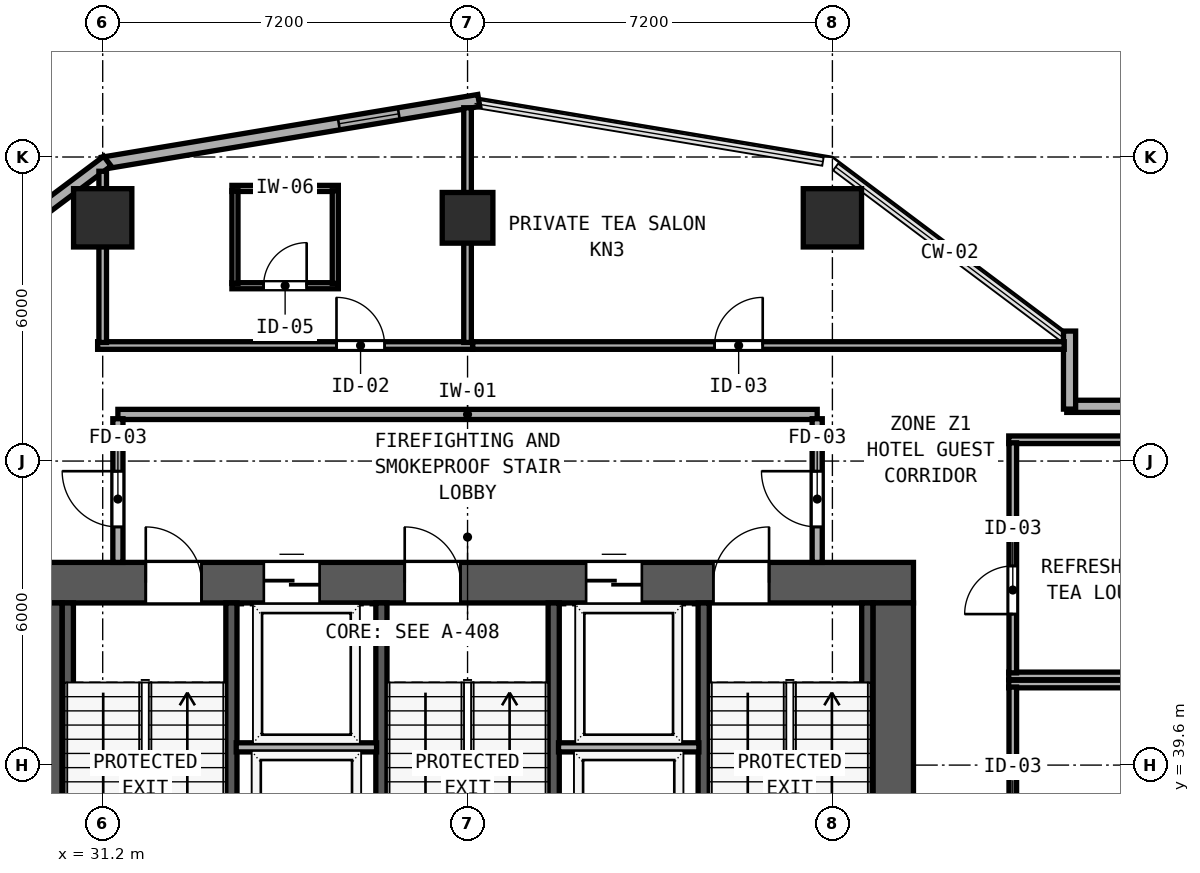
"""IFC4 building model, lengths in metres.
Left out: names, types, materials, properties, quantities, classifications, styles, units other than length and angle.
Written with IfcOpenShell. Run it as: python <this file> out.ifc"""

import sys

from ifc_helpers import new_model, si_unit, direction, frame, frame_2d, origin, origin_2d, place, context, subcontext, project, spatial, rectangle, hollow_rectangle, extrude, element, fill, save


model = new_model("IFC4")
c1 = context("Model", 3, precision=1e-05, world=origin(), true_north=direction((0.0, 1.0)))
c2 = subcontext(c1, "Body", "Model", "MODEL_VIEW")
j1 = project(units=[si_unit("LENGTHUNIT", "METRE"), si_unit("PLANEANGLEUNIT", "RADIAN")], contexts=[c1])
p1 = place(None, origin())
s1 = spatial("IfcSite", under=j1, at=p1, CompositionType="ELEMENT")
p2 = place(p1, origin())
s2 = spatial("IfcBuilding", under=s1, at=p2, CompositionType="ELEMENT")
p3 = place(p2, frame((0.0, 0.0, 85.6)))
s3 = spatial("IfcBuildingStorey", under=s2, at=p3, CompositionType="ELEMENT", Elevation=85.6)
p4 = place(p3, frame((29.6, 43.2, 0.0), z_axis=(0.0, 0.0, 1.0), x_axis=(1.0, 0.0, 0.0)))
e1 = element("IfcWall", 1, at=p4, inside=s3, PredefinedType="SHEAR", context=c2, shape_type="SweptSolid", body=[
    extrude(rectangle(XDim=17.6, YDim=0.8, at=frame_2d((8.8, 0.0))), origin(), (0.0, 0.0, 1.0), 3.54),
])
p5 = place(p4, frame((2.45, 0.0, 0.0)))
e2 = element("IfcOpeningElement", 2, at=p5, cuts=e1, PredefinedType="OPENING", context=c2, shape_type="SweptSolid", body=[
    extrude(rectangle(XDim=1.1, YDim=2.15, at=frame_2d((0.55, 1.075))), frame((0.0, 0.41, 0.0), z_axis=(0.0, -1.0, 0.0), x_axis=(1.0, 0.0, 0.0)), (0.0, 0.0, 1.0), 0.82),
])
p6 = place(p4, frame((7.56, 0.0, 0.0)))
e3 = element("IfcOpeningElement", 3, at=p6, cuts=e1, PredefinedType="OPENING", context=c2, shape_type="SweptSolid", body=[
    extrude(rectangle(XDim=1.1, YDim=2.15, at=frame_2d((0.55, 1.075))), frame((0.0, 0.41, 0.0), z_axis=(0.0, -1.0, 0.0), x_axis=(1.0, 0.0, 0.0)), (0.0, 0.0, 1.0), 0.82),
])
p7 = place(p4, frame((13.65, 0.0, 0.0)))
e4 = element("IfcOpeningElement", 4, at=p7, cuts=e1, PredefinedType="OPENING", context=c2, shape_type="SweptSolid", body=[
    extrude(rectangle(XDim=1.1, YDim=2.15, at=frame_2d((0.55, 1.075))), frame((0.0, 0.41, 0.0), z_axis=(0.0, -1.0, 0.0), x_axis=(1.0, 0.0, 0.0)), (0.0, 0.0, 1.0), 0.82),
])
p8 = place(p4, frame((4.78, 0.0, 0.0)))
e5 = element("IfcOpeningElement", 5, at=p8, cuts=e1, PredefinedType="OPENING", context=c2, shape_type="SweptSolid", body=[
    extrude(rectangle(XDim=1.1, YDim=2.2, at=frame_2d((0.55, 1.1))), frame((0.0, 0.41, 0.0), z_axis=(0.0, -1.0, 0.0), x_axis=(1.0, 0.0, 0.0)), (0.0, 0.0, 1.0), 0.82),
])
p9 = place(p4, frame((11.14, 0.0, 0.0)))
e6 = element("IfcOpeningElement", 6, at=p9, cuts=e1, PredefinedType="OPENING", context=c2, shape_type="SweptSolid", body=[
    extrude(rectangle(XDim=1.1, YDim=2.2, at=frame_2d((0.55, 1.1))), frame((0.0, 0.41, 0.0), z_axis=(0.0, -1.0, 0.0), x_axis=(1.0, 0.0, 0.0)), (0.0, 0.0, 1.0), 0.82),
])
for number, where, z_axis, x_axis in (
    (7, (30.0, 32.8, 0.0), (0.0, 0.0, 1.0), (0.0, 1.0, 0.0)),
    (8, (46.8, 32.8, 0.0), (0.0, 0.0, 1.0), (0.0, 1.0, 0.0)),
):
    element("IfcWall", number, at=place(p3, frame(where, z_axis=z_axis, x_axis=x_axis)), inside=s3, PredefinedType="SHEAR", context=c2, shape_type="SweptSolid", body=[
        extrude(rectangle(XDim=10.0, YDim=0.8, at=frame_2d((5.0, 0.0))), origin(), (0.0, 0.0, 1.0), 3.54),
    ])
for number, where, z_axis, x_axis in (
    (9, (30.512, 35.39, 0.0), (0.0, 0.0, 1.0), (0.0, 1.0, 0.0)),
    (10, (33.74, 35.39, 0.0), (0.0, 0.0, 1.0), (0.0, 1.0, 0.0)),
    (11, (36.7, 35.39, 0.0), (0.0, 0.0, 1.0), (0.0, 1.0, 0.0)),
    (12, (40.1, 35.39, 0.0), (0.0, 0.0, 1.0), (0.0, 1.0, 0.0)),
    (13, (43.06, 35.39, 0.0), (0.0, 0.0, 1.0), (0.0, 1.0, 0.0)),
    (14, (46.288, 35.39, 0.0), (0.0, 0.0, 1.0), (0.0, 1.0, 0.0)),
):
    element("IfcWall", number, at=place(p3, frame(where, z_axis=z_axis, x_axis=x_axis)), inside=s3, PredefinedType="SHEAR", context=c2, shape_type="SweptSolid", body=[
        extrude(rectangle(XDim=7.41, YDim=0.22, at=frame_2d((3.705, 0.0))), origin(), (0.0, 0.0, 1.0), 3.54),
    ])
for number, where, z_axis, x_axis in (
    (15, (31.2, 50.4, 0.0), (0.0, 0.0, 1.0), (1.0, 0.0, 0.0)),
    (16, (45.6, 50.4, 0.0), (0.0, 0.0, 1.0), (1.0, 0.0, 0.0)),
):
    element("IfcColumn", number, at=place(p3, frame(where, z_axis=z_axis, x_axis=x_axis)), inside=s3, PredefinedType="COLUMN", context=c2, shape_type="SweptSolid", body=[
        extrude(hollow_rectangle(XDim=1.15, YDim=1.15, WallThickness=0.042, at=origin_2d()), origin(), (0.0, 0.0, 1.0), 3.8),
    ])
p10 = place(p3, frame((38.4, 50.4, 0.0), z_axis=(0.0, 0.0, 1.0), x_axis=(1.0, 0.0, 0.0)))
e17 = element("IfcColumn", 17, at=p10, inside=s3, PredefinedType="COLUMN", context=c2, shape_type="SweptSolid", body=[
    extrude(hollow_rectangle(XDim=1.0, YDim=1.0, WallThickness=0.038, at=origin_2d()), origin(), (0.0, 0.0, 1.0), 3.8),
])
p11 = place(p3, frame((51.535, 46.68, 0.0), z_axis=(0.0, 0.0, 1.0), x_axis=(-1.0, 0.0, 0.0)))
e18 = element("IfcWall", 18, at=p11, inside=s3, PredefinedType="SOLIDWALL", context=c2, shape_type="SweptSolid", body=[
    extrude(rectangle(XDim=1.31, YDim=0.24, at=frame_2d((0.655, 0.0))), origin(), (0.0, 0.0, 1.0), 3.54),
])
p12 = place(p3, frame((50.28, 46.625, 0.0), z_axis=(0.0, 0.0, 1.0), x_axis=(0.0, 1.0, 0.0)))
e19 = element("IfcWall", 19, at=p12, inside=s3, PredefinedType="SOLIDWALL", context=c2, shape_type="SweptSolid", body=[
    extrude(rectangle(XDim=1.54, YDim=0.24, at=frame_2d((0.77, 0.0))), origin(), (0.0, 0.0, 1.0), 3.54),
])
p13 = place(p3, frame((38.622, 52.715, 0.0), z_axis=(0.0, 0.0, 1.0), x_axis=(-0.98639129485, -0.164414760418, 0.0)))
e20 = element("IfcWall", 20, at=p13, inside=s3, PredefinedType="SOLIDWALL", context=c2, shape_type="SweptSolid", body=[
    extrude(rectangle(XDim=7.53, YDim=0.24, at=frame_2d((3.765, 0.0))), origin(), (0.0, 0.0, 1.0), 3.54),
])
p14 = place(p13, frame((1.6, 0.0, 0.85)))
e21 = element("IfcOpeningElement", 21, at=p14, cuts=e20, PredefinedType="OPENING", context=c2, shape_type="SweptSolid", body=[
    extrude(rectangle(XDim=1.2, YDim=1.85, at=frame_2d((0.6, 0.925))), frame((0.0, 0.13, 0.0), z_axis=(0.0, -1.0, 0.0), x_axis=(1.0, 0.0, 0.0)), (0.0, 0.0, 1.0), 0.26),
])
p15 = place(p3, frame((31.292, 51.519, 0.0), z_axis=(0.0, 0.0, 1.0), x_axis=(-0.8, -0.6, 0.0)))
e22 = element("IfcWall", 22, at=p15, inside=s3, PredefinedType="SOLIDWALL", context=c2, shape_type="SweptSolid", body=[
    extrude(rectangle(XDim=6.021, YDim=0.24, at=frame_2d((3.01, 0.0))), origin(), (0.0, 0.0, 1.0), 3.54),
])
p16 = place(p15, frame((1.6, 0.0, 0.85)))
e23 = element("IfcOpeningElement", 23, at=p16, cuts=e22, PredefinedType="OPENING", context=c2, shape_type="SweptSolid", body=[
    extrude(rectangle(XDim=1.2, YDim=1.85, at=frame_2d((0.6, 0.925))), frame((0.0, 0.13, 0.0), z_axis=(0.0, -1.0, 0.0), x_axis=(1.0, 0.0, 0.0)), (0.0, 0.0, 1.0), 0.26),
])
p17 = place(p3, frame((31.5, 46.52, 0.0), z_axis=(0.0, 0.0, 1.0), x_axis=(1.0, 0.0, 0.0)))
e24 = element("IfcWall", 24, at=p17, inside=s3, PredefinedType="SOLIDWALL", context=c2, shape_type="SweptSolid", body=[
    extrude(rectangle(XDim=13.8, YDim=0.2, at=frame_2d((6.9, 0.0))), origin(), (0.0, 0.0, 1.0), 3.54),
])
p18 = place(p3, frame((31.5, 43.6, 0.0), z_axis=(0.0, 0.0, 1.0), x_axis=(0.0, 1.0, 0.0)))
e25 = element("IfcWall", 25, at=p18, inside=s3, PredefinedType="SOLIDWALL", context=c2, shape_type="SweptSolid", body=[
    extrude(rectangle(XDim=2.835, YDim=0.2, at=frame_2d((1.417, 0.0))), origin(), (0.0, 0.0, 1.0), 3.54),
])
p19 = place(p18, frame((1.8, 0.0, 0.0), z_axis=(0.0, 0.0, 1.0), x_axis=(-1.0, 0.0, 0.0)))
e26 = element("IfcOpeningElement", 26, at=p19, cuts=e25, PredefinedType="OPENING", context=c2, shape_type="SweptSolid", body=[
    extrude(rectangle(XDim=1.1, YDim=2.15, at=frame_2d((0.55, 1.075))), frame((0.0, 0.11, 0.0), z_axis=(0.0, -1.0, 0.0), x_axis=(1.0, 0.0, 0.0)), (0.0, 0.0, 1.0), 0.22),
])
p20 = place(p3, frame((45.3, 43.6, 0.0), z_axis=(0.0, 0.0, 1.0), x_axis=(0.0, 1.0, 0.0)))
e27 = element("IfcWall", 27, at=p20, inside=s3, PredefinedType="SOLIDWALL", context=c2, shape_type="SweptSolid", body=[
    extrude(rectangle(XDim=2.835, YDim=0.2, at=frame_2d((1.417, 0.0))), origin(), (0.0, 0.0, 1.0), 3.54),
])
p21 = place(p20, frame((0.7, 0.0, 0.0)))
e28 = element("IfcOpeningElement", 28, at=p21, cuts=e27, PredefinedType="OPENING", context=c2, shape_type="SweptSolid", body=[
    extrude(rectangle(XDim=1.1, YDim=2.15, at=frame_2d((0.55, 1.075))), frame((0.0, 0.11, 0.0), z_axis=(0.0, -1.0, 0.0), x_axis=(1.0, 0.0, 0.0)), (0.0, 0.0, 1.0), 0.22),
])
for number, where, z_axis, x_axis in (
    (29, (33.835, 39.95, 0.0), (0.0, 0.0, 1.0), (1.0, 0.0, 0.0)),
    (30, (40.195, 39.95, 0.0), (0.0, 0.0, 1.0), (1.0, 0.0, 0.0)),
):
    element("IfcWall", number, at=place(p3, frame(where, z_axis=z_axis, x_axis=x_axis)), inside=s3, PredefinedType="SOLIDWALL", context=c2, shape_type="SweptSolid", body=[
        extrude(rectangle(XDim=2.77, YDim=0.18, at=frame_2d((1.385, 0.0))), origin(), (0.0, 0.0, 1.0), 3.54),
    ])
p22 = place(p3, frame((49.08, 41.2, 0.0), z_axis=(0.0, 0.0, 1.0), x_axis=(1.0, 0.0, 0.0)))
e31 = element("IfcWall", 31, at=p22, inside=s3, PredefinedType="PARTITIONING", context=c2, shape_type="SweptSolid", body=[
    extrude(rectangle(XDim=3.8, YDim=0.15, at=frame_2d((1.9, 0.0))), origin(), (0.0, 0.0, 1.0), 3.54),
])
p23 = place(p3, frame((49.16, 36.52, 0.0), z_axis=(0.0, 0.0, 1.0), x_axis=(0.0, 1.0, 0.0)))
e32 = element("IfcWall", 32, at=p23, inside=s3, PredefinedType="PARTITIONING", context=c2, shape_type="SweptSolid", body=[
    extrude(rectangle(XDim=4.62, YDim=0.15, at=frame_2d((2.31, 0.0))), origin(), (0.0, 0.0, 1.0), 3.54),
])
p24 = place(p23, frame((1.36, 0.0, 0.0)))
e33 = element("IfcOpeningElement", 33, at=p24, cuts=e32, PredefinedType="OPENING", context=c2, shape_type="SweptSolid", body=[
    extrude(rectangle(XDim=0.95, YDim=2.12, at=frame_2d((0.475, 1.06))), frame((0.0, 0.085, 0.0), z_axis=(0.0, -1.0, 0.0), x_axis=(1.0, 0.0, 0.0)), (0.0, 0.0, 1.0), 0.17),
])
p25 = place(p3, frame((49.08, 46.02, 0.0), z_axis=(0.0, 0.0, 1.0), x_axis=(1.0, 0.0, 0.0)))
e34 = element("IfcWall", 34, at=p25, inside=s3, PredefinedType="PARTITIONING", context=c2, shape_type="SweptSolid", body=[
    extrude(rectangle(XDim=2.295, YDim=0.15, at=frame_2d((1.147, 0.0))), origin(), (0.0, 0.0, 1.0), 3.54),
])
p26 = place(p3, frame((49.08, 41.36, 0.0), z_axis=(0.0, 0.0, 1.0), x_axis=(1.0, 0.0, 0.0)))
e35 = element("IfcWall", 35, at=p26, inside=s3, PredefinedType="PARTITIONING", context=c2, shape_type="SweptSolid", body=[
    extrude(rectangle(XDim=3.8, YDim=0.15, at=frame_2d((1.9, 0.0))), origin(), (0.0, 0.0, 1.0), 3.54),
])
p27 = place(p3, frame((49.16, 41.42, 0.0), z_axis=(0.0, 0.0, 1.0), x_axis=(0.0, 1.0, 0.0)))
e36 = element("IfcWall", 36, at=p27, inside=s3, PredefinedType="PARTITIONING", context=c2, shape_type="SweptSolid", body=[
    extrude(rectangle(XDim=4.54, YDim=0.15, at=frame_2d((2.27, 0.0))), origin(), (0.0, 0.0, 1.0), 3.54),
])
p28 = place(p27, frame((1.16, 0.0, 0.0)))
e37 = element("IfcOpeningElement", 37, at=p28, cuts=e36, PredefinedType="OPENING", context=c2, shape_type="SweptSolid", body=[
    extrude(rectangle(XDim=0.95, YDim=2.12, at=frame_2d((0.475, 1.06))), frame((0.0, 0.085, 0.0), z_axis=(0.0, -1.0, 0.0), x_axis=(1.0, 0.0, 0.0)), (0.0, 0.0, 1.0), 0.17),
])
p29 = place(p3, frame((31.1, 47.88, 0.0), z_axis=(0.0, 0.0, 1.0), x_axis=(1.0, 0.0, 0.0)))
e38 = element("IfcWall", 38, at=p29, inside=s3, PredefinedType="PARTITIONING", context=c2, shape_type="SweptSolid", body=[
    extrude(rectangle(XDim=7.4, YDim=0.15, at=frame_2d((3.7, 0.0))), origin(), (0.0, 0.0, 1.0), 3.54),
])
p30 = place(p29, frame((4.714, 0.0, 0.0)))
e39 = element("IfcOpeningElement", 39, at=p30, cuts=e38, PredefinedType="OPENING", context=c2, shape_type="SweptSolid", body=[
    extrude(rectangle(XDim=0.95, YDim=2.15, at=frame_2d((0.475, 1.075))), frame((0.0, 0.085, 0.0), z_axis=(0.0, -1.0, 0.0), x_axis=(1.0, 0.0, 0.0)), (0.0, 0.0, 1.0), 0.17),
])
p31 = place(p3, frame((31.2, 47.94, 0.0), z_axis=(0.0, 0.0, 1.0), x_axis=(0.0, 1.0, 0.0)))
e40 = element("IfcWall", 40, at=p31, inside=s3, PredefinedType="PARTITIONING", context=c2, shape_type="SweptSolid", body=[
    extrude(rectangle(XDim=3.379, YDim=0.15, at=frame_2d((1.689, 0.0))), origin(), (0.0, 0.0, 1.0), 2.925),
])
p32 = place(p3, frame((38.4, 47.94, 0.0), z_axis=(0.0, 0.0, 1.0), x_axis=(0.0, 1.0, 0.0)))
e41 = element("IfcWall", 41, at=p32, inside=s3, PredefinedType="PARTITIONING", context=c2, shape_type="SweptSolid", body=[
    extrude(rectangle(XDim=4.632, YDim=0.15, at=frame_2d((2.316, 0.0))), origin(), (0.0, 0.0, 1.0), 3.54),
])
p33 = place(p3, frame((33.75, 50.98, 0.0), z_axis=(0.0, 0.0, 1.0), x_axis=(1.0, 0.0, 0.0)))
e42 = element("IfcWall", 42, at=p33, inside=s3, PredefinedType="PARTITIONING", context=c2, shape_type="SweptSolid", body=[
    extrude(rectangle(XDim=2.1, YDim=0.12, at=frame_2d((1.05, 0.0))), origin(), (0.0, 0.0, 1.0), 3.54),
])
p34 = place(p3, frame((33.75, 49.06, 0.0), z_axis=(0.0, 0.0, 1.0), x_axis=(1.0, 0.0, 0.0)))
e43 = element("IfcWall", 43, at=p34, inside=s3, PredefinedType="PARTITIONING", context=c2, shape_type="SweptSolid", body=[
    extrude(rectangle(XDim=2.1, YDim=0.12, at=frame_2d((1.05, 0.0))), origin(), (0.0, 0.0, 1.0), 3.54),
])
p35 = place(p34, frame((0.625, 0.0, 0.0)))
e44 = element("IfcOpeningElement", 44, at=p35, cuts=e43, PredefinedType="OPENING", context=c2, shape_type="SweptSolid", body=[
    extrude(rectangle(XDim=0.85, YDim=2.1, at=frame_2d((0.425, 1.05))), frame((0.0, 0.07, 0.0), z_axis=(0.0, -1.0, 0.0), x_axis=(1.0, 0.0, 0.0)), (0.0, 0.0, 1.0), 0.14),
])
for number, where, z_axis, x_axis in (
    (45, (33.81, 49.105, 0.0), (0.0, 0.0, 1.0), (0.0, 1.0, 0.0)),
    (46, (35.79, 49.105, 0.0), (0.0, 0.0, 1.0), (0.0, 1.0, 0.0)),
):
    element("IfcWall", number, at=place(p3, frame(where, z_axis=z_axis, x_axis=x_axis)), inside=s3, PredefinedType="PARTITIONING", context=c2, shape_type="SweptSolid", body=[
        extrude(rectangle(XDim=1.83, YDim=0.12, at=frame_2d((0.915, 0.0))), origin(), (0.0, 0.0, 1.0), 3.54),
    ])
p36 = place(p3, frame((38.502, 47.88, 0.0), z_axis=(0.0, 0.0, 1.0), x_axis=(1.0, 0.0, 0.0)))
e47 = element("IfcWall", 47, at=p36, inside=s3, PredefinedType="PARTITIONING", context=c2, shape_type="SweptSolid", body=[
    extrude(rectangle(XDim=11.673, YDim=0.15, at=frame_2d((5.836, 0.0))), origin(), (0.0, 0.0, 1.0), 3.54),
])
p37 = place(p36, frame((4.773, 0.0, 0.0)))
e48 = element("IfcOpeningElement", 48, at=p37, cuts=e47, PredefinedType="OPENING", context=c2, shape_type="SweptSolid", body=[
    extrude(rectangle(XDim=0.95, YDim=2.12, at=frame_2d((0.475, 1.06))), frame((0.0, 0.085, 0.0), z_axis=(0.0, -1.0, 0.0), x_axis=(1.0, 0.0, 0.0)), (0.0, 0.0, 1.0), 0.17),
])
p38 = place(p14, origin())
e49 = element("IfcWindow", 49, at=p38, inside=s3, PartitioningType="SINGLE_PANEL", PredefinedType="WINDOW", context=c2, shape_type="SweptSolid", body=[
    extrude(rectangle(XDim=1.2, YDim=1.85, at=frame_2d((0.6, 0.925))), frame((0.0, 0.03, 0.0), z_axis=(0.0, -1.0, 0.0), x_axis=(1.0, 0.0, 0.0)), (0.0, 0.0, 1.0), 0.06),
])
fill(e21, e49)
p39 = place(p5, origin())
e50 = element("IfcDoor", 50, at=p39, inside=s3, OperationType="SINGLE_SWING_LEFT", PredefinedType="DOOR", context=c2, shape_type="SweptSolid", body=[
    extrude(rectangle(XDim=1.1, YDim=2.15, at=frame_2d((0.55, 1.075))), frame((0.0, 0.185, 0.0), z_axis=(0.0, -1.0, 0.0), x_axis=(1.0, 0.0, 0.0)), (0.0, 0.0, 1.0), 0.05),
])
fill(e2, e50)
p40 = place(p6, origin())
e51 = element("IfcDoor", 51, at=p40, inside=s3, OperationType="SINGLE_SWING_LEFT", PredefinedType="DOOR", context=c2, shape_type="SweptSolid", body=[
    extrude(rectangle(XDim=1.1, YDim=2.15, at=frame_2d((0.55, 1.075))), frame((0.0, 0.185, 0.0), z_axis=(0.0, -1.0, 0.0), x_axis=(1.0, 0.0, 0.0)), (0.0, 0.0, 1.0), 0.05),
])
fill(e3, e51)
p41 = place(p7, origin())
e52 = element("IfcDoor", 52, at=p41, inside=s3, OperationType="SINGLE_SWING_RIGHT", PredefinedType="DOOR", context=c2, shape_type="SweptSolid", body=[
    extrude(rectangle(XDim=1.1, YDim=2.15, at=frame_2d((0.55, 1.075))), frame((0.0, 0.185, 0.0), z_axis=(0.0, -1.0, 0.0), x_axis=(1.0, 0.0, 0.0)), (0.0, 0.0, 1.0), 0.05),
])
fill(e4, e52)
p42 = place(p19, origin())
e53 = element("IfcDoor", 53, at=p42, inside=s3, OperationType="SINGLE_SWING_LEFT", PredefinedType="DOOR", context=c2, shape_type="SweptSolid", body=[
    extrude(rectangle(XDim=1.1, YDim=2.15, at=frame_2d((0.55, 1.075))), frame((0.0, 0.025, 0.0), z_axis=(0.0, -1.0, 0.0), x_axis=(1.0, 0.0, 0.0)), (0.0, 0.0, 1.0), 0.05),
])
fill(e26, e53)
p43 = place(p21, origin())
e54 = element("IfcDoor", 54, at=p43, inside=s3, OperationType="SINGLE_SWING_RIGHT", PredefinedType="DOOR", context=c2, shape_type="SweptSolid", body=[
    extrude(rectangle(XDim=1.1, YDim=2.15, at=frame_2d((0.55, 1.075))), frame((0.0, 0.025, 0.0), z_axis=(0.0, -1.0, 0.0), x_axis=(1.0, 0.0, 0.0)), (0.0, 0.0, 1.0), 0.05),
])
fill(e28, e54)
p44 = place(p8, origin())
e55 = element("IfcDoor", 55, at=p44, inside=s3, OperationType="SLIDING_TO_LEFT", PredefinedType="DOOR", context=c2, shape_type="SweptSolid", body=[
    extrude(rectangle(XDim=1.1, YDim=2.2, at=frame_2d((0.55, 1.1))), frame((0.0, 0.185, 0.0), z_axis=(0.0, -1.0, 0.0), x_axis=(1.0, 0.0, 0.0)), (0.0, 0.0, 1.0), 0.05),
])
fill(e5, e55)
p45 = place(p9, origin())
e56 = element("IfcDoor", 56, at=p45, inside=s3, OperationType="SLIDING_TO_LEFT", PredefinedType="DOOR", context=c2, shape_type="SweptSolid", body=[
    extrude(rectangle(XDim=1.1, YDim=2.2, at=frame_2d((0.55, 1.1))), frame((0.0, 0.185, 0.0), z_axis=(0.0, -1.0, 0.0), x_axis=(1.0, 0.0, 0.0)), (0.0, 0.0, 1.0), 0.05),
])
fill(e6, e56)
p46 = place(p28, origin())
e57 = element("IfcDoor", 57, at=p46, inside=s3, OperationType="SINGLE_SWING_LEFT", PredefinedType="DOOR", context=c2, shape_type="SweptSolid", body=[
    extrude(rectangle(XDim=0.95, YDim=2.12, at=frame_2d((0.475, 1.06))), frame((0.0, 0.025, 0.0), z_axis=(0.0, -1.0, 0.0), x_axis=(1.0, 0.0, 0.0)), (0.0, 0.0, 1.0), 0.05),
])
fill(e37, e57)
p47 = place(p30, origin())
e58 = element("IfcDoor", 58, at=p47, inside=s3, OperationType="SINGLE_SWING_LEFT", PredefinedType="DOOR", context=c2, shape_type="SweptSolid", body=[
    extrude(rectangle(XDim=0.95, YDim=2.15, at=frame_2d((0.475, 1.075))), frame((0.0, 0.025, 0.0), z_axis=(0.0, -1.0, 0.0), x_axis=(1.0, 0.0, 0.0)), (0.0, 0.0, 1.0), 0.05),
])
fill(e39, e58)
p48 = place(p35, origin())
e59 = element("IfcDoor", 59, at=p48, inside=s3, OperationType="SINGLE_SWING_RIGHT", PredefinedType="DOOR", context=c2, shape_type="SweptSolid", body=[
    extrude(rectangle(XDim=0.85, YDim=2.1, at=frame_2d((0.425, 1.05))), frame((0.0, 0.025, 0.0), z_axis=(0.0, -1.0, 0.0), x_axis=(1.0, 0.0, 0.0)), (0.0, 0.0, 1.0), 0.05),
])
fill(e44, e59)
p49 = place(p37, origin())
e60 = element("IfcDoor", 60, at=p49, inside=s3, OperationType="SINGLE_SWING_RIGHT", PredefinedType="DOOR", context=c2, shape_type="SweptSolid", body=[
    extrude(rectangle(XDim=0.95, YDim=2.12, at=frame_2d((0.475, 1.06))), frame((0.0, 0.025, 0.0), z_axis=(0.0, -1.0, 0.0), x_axis=(1.0, 0.0, 0.0)), (0.0, 0.0, 1.0), 0.05),
])
fill(e48, e60)
save(model, sys.argv[1])
